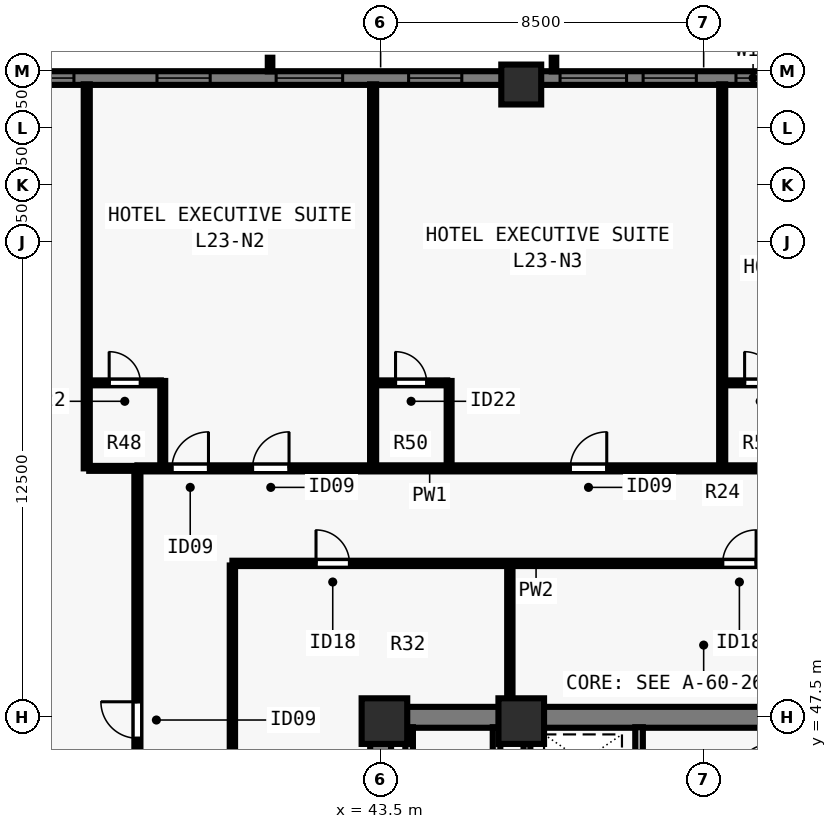
"""IFC4 building model, lengths in metres.
Left out: names, types, materials, properties, quantities, classifications, styles, units other than length and angle.
Written with IfcOpenShell. Run it as: python <this file> out.ifc"""

import sys

from ifc_helpers import new_model, si_unit, direction, frame, frame_2d, origin, origin_2d, place, context, subcontext, project, spatial, rectangle, extrude, element, fill, save


model = new_model("IFC4")
c1 = context("Model", 3, precision=1e-05, world=origin(), true_north=direction((0.0, 1.0)))
c2 = subcontext(c1, "Body", "Model", "MODEL_VIEW")
j1 = project(units=[si_unit("LENGTHUNIT", "METRE"), si_unit("PLANEANGLEUNIT", "RADIAN")], contexts=[c1])
p1 = place(None, origin())
s1 = spatial("IfcSite", under=j1, at=p1, CompositionType="ELEMENT")
p2 = place(p1, origin())
s2 = spatial("IfcBuilding", under=s1, at=p2, CompositionType="ELEMENT")
p3 = place(p2, frame((0.0, 0.0, 86.5)))
s3 = spatial("IfcBuildingStorey", under=s2, at=p3, CompositionType="ELEMENT", Elevation=86.5)
for number, where, z_axis, x_axis in (
    (1, (43.6, 47.4, 0.0), (0.0, 0.0, 1.0), (1.0, 0.0, 0.0)),
    (2, (47.2, 47.4, 0.0), (0.0, 0.0, 1.0), (1.0, 0.0, 0.0)),
):
    element("IfcColumn", number, at=place(p3, frame(where, z_axis=z_axis, x_axis=x_axis)), inside=s3, PredefinedType="COLUMN", context=c2, shape_type="SweptSolid", body=[
        extrude(rectangle(XDim=1.2, YDim=1.2, at=origin_2d()), origin(), (0.0, 0.0, 1.0), 3.5),
    ])
p4 = place(p3, frame((47.2, 64.15, 0.0), z_axis=(0.0, 0.0, 1.0), x_axis=(1.0, 0.0, 0.0)))
e3 = element("IfcColumn", 3, at=p4, inside=s3, PredefinedType="COLUMN", context=c2, shape_type="SweptSolid", body=[
    extrude(rectangle(XDim=1.05, YDim=1.05, at=origin_2d()), origin(), (0.0, 0.0, 1.0), 3.5),
])
p5 = place(p3, frame((29.5, 64.32, 0.0), z_axis=(0.0, 0.0, 1.0), x_axis=(1.0, 0.0, 0.0)))
e4 = element("IfcWall", 4, at=p5, inside=s3, PredefinedType="SOLIDWALL", context=c2, shape_type="SweptSolid", body=[
    extrude(rectangle(XDim=27.562, YDim=0.36, at=frame_2d((13.781, 0.0))), origin(), (0.0, 0.0, 1.0), 3.28),
])
p6 = place(p5, frame((4.18, 0.0, 0.8)))
e5 = element("IfcOpeningElement", 5, at=p6, cuts=e4, PredefinedType="OPENING", context=c2, shape_type="SweptSolid", body=[
    extrude(rectangle(XDim=1.75, YDim=1.544, at=frame_2d((0.875, 0.772))), frame((0.0, 0.19, 0.0), z_axis=(0.0, -1.0, 0.0), x_axis=(1.0, 0.0, 0.0)), (0.0, 0.0, 1.0), 0.38),
])
p7 = place(p5, frame((8.115, 0.0, 0.8)))
e6 = element("IfcOpeningElement", 6, at=p7, cuts=e4, PredefinedType="OPENING", context=c2, shape_type="SweptSolid", body=[
    extrude(rectangle(XDim=1.4, YDim=1.544, at=frame_2d((0.7, 0.772))), frame((0.0, 0.19, 0.0), z_axis=(0.0, -1.0, 0.0), x_axis=(1.0, 0.0, 0.0)), (0.0, 0.0, 1.0), 0.38),
])
p8 = place(p5, frame((11.251, 0.0, 0.8)))
e7 = element("IfcOpeningElement", 7, at=p8, cuts=e4, PredefinedType="OPENING", context=c2, shape_type="SweptSolid", body=[
    extrude(rectangle(XDim=1.75, YDim=1.544, at=frame_2d((0.875, 0.772))), frame((0.0, 0.19, 0.0), z_axis=(0.0, -1.0, 0.0), x_axis=(1.0, 0.0, 0.0)), (0.0, 0.0, 1.0), 0.38),
])
p9 = place(p5, frame((14.736, 0.0, 0.8)))
e8 = element("IfcOpeningElement", 8, at=p9, cuts=e4, PredefinedType="OPENING", context=c2, shape_type="SweptSolid", body=[
    extrude(rectangle(XDim=1.4, YDim=1.544, at=frame_2d((0.7, 0.772))), frame((0.0, 0.19, 0.0), z_axis=(0.0, -1.0, 0.0), x_axis=(1.0, 0.0, 0.0)), (0.0, 0.0, 1.0), 0.38),
])
p10 = place(p5, frame((18.721, 0.0, 0.8)))
e9 = element("IfcOpeningElement", 9, at=p10, cuts=e4, PredefinedType="OPENING", context=c2, shape_type="SweptSolid", body=[
    extrude(rectangle(XDim=1.75, YDim=1.544, at=frame_2d((0.875, 0.772))), frame((0.0, 0.19, 0.0), z_axis=(0.0, -1.0, 0.0), x_axis=(1.0, 0.0, 0.0)), (0.0, 0.0, 1.0), 0.38),
])
p11 = place(p5, frame((20.907, 0.0, 0.8)))
e10 = element("IfcOpeningElement", 10, at=p11, cuts=e4, PredefinedType="OPENING", context=c2, shape_type="SweptSolid", body=[
    extrude(rectangle(XDim=1.4, YDim=1.544, at=frame_2d((0.7, 0.772))), frame((0.0, 0.19, 0.0), z_axis=(0.0, -1.0, 0.0), x_axis=(1.0, 0.0, 0.0)), (0.0, 0.0, 1.0), 0.38),
])
p12 = place(p5, frame((23.35, 0.0, 0.8)))
e11 = element("IfcOpeningElement", 11, at=p12, cuts=e4, PredefinedType="OPENING", context=c2, shape_type="SweptSolid", body=[
    extrude(rectangle(XDim=0.9, YDim=1.544, at=frame_2d((0.45, 0.772))), frame((0.0, 0.19, 0.0), z_axis=(0.0, -1.0, 0.0), x_axis=(1.0, 0.0, 0.0)), (0.0, 0.0, 1.0), 0.38),
])
p13 = place(p3, frame((43.225, 47.5, 0.0), z_axis=(0.0, 0.0, 1.0), x_axis=(1.0, 0.0, 0.0)))
e12 = element("IfcWall", 12, at=p13, inside=s3, PredefinedType="SHEAR", context=c2, shape_type="SweptSolid", body=[
    extrude(rectangle(XDim=17.55, YDim=0.55, at=frame_2d((8.775, 0.0))), origin(), (0.0, 0.0, 1.0), 3.28),
])
p14 = place(p3, frame((43.5, 40.8, 0.0), z_axis=(0.0, 0.0, 1.0), x_axis=(0.0, 1.0, 0.0)))
e13 = element("IfcWall", 13, at=p14, inside=s3, PredefinedType="SHEAR", context=c2, shape_type="SweptSolid", body=[
    extrude(rectangle(XDim=6.435, YDim=0.55, at=frame_2d((3.218, 0.0))), origin(), (0.0, 0.0, 1.0), 3.28),
])
p15 = place(p3, frame((50.3, 40.585, 0.0), z_axis=(0.0, 0.0, 1.0), x_axis=(0.0, 1.0, 0.0)))
e14 = element("IfcWall", 14, at=p15, inside=s3, PredefinedType="SOLIDWALL", context=c2, shape_type="SweptSolid", body=[
    extrude(rectangle(XDim=6.655, YDim=0.2, at=frame_2d((3.328, 0.0))), origin(), (0.0, 0.0, 1.0), 3.28),
])
p16 = place(p15, frame((5.065, 0.0, 0.0)))
e15 = element("IfcOpeningElement", 15, at=p16, cuts=e14, PredefinedType="OPENING", context=c2, shape_type="SweptSolid", body=[
    extrude(rectangle(XDim=0.8, YDim=2.08, at=frame_2d((0.4, 1.04))), frame((0.0, 0.11, 0.0), z_axis=(0.0, -1.0, 0.0), x_axis=(1.0, 0.0, 0.0)), (0.0, 0.0, 1.0), 0.22),
])
for number, where, z_axis, x_axis in (
    (16, (46.55, 43.735, 0.0), (0.0, 0.0, 1.0), (0.0, 1.0, 0.0)),
    (17, (44.25, 43.735, 0.0), (0.0, 0.0, 1.0), (0.0, 1.0, 0.0)),
):
    element("IfcWall", number, at=place(p3, frame(where, z_axis=z_axis, x_axis=x_axis)), inside=s3, PredefinedType="SOLIDWALL", context=c2, shape_type="SweptSolid", body=[
        extrude(rectangle(XDim=3.505, YDim=0.2, at=frame_2d((1.752, 0.0))), origin(), (0.0, 0.0, 1.0), 3.28),
    ])
p17 = place(p3, frame((47.35, 43.735, 0.0), z_axis=(0.0, 0.0, 1.0), x_axis=(0.0, 1.0, 0.0)))
e18 = element("IfcWall", 18, at=p17, inside=s3, PredefinedType="SOLIDWALL", context=c2, shape_type="SweptSolid", body=[
    extrude(rectangle(XDim=3.505, YDim=0.18, at=frame_2d((1.752, 0.0))), origin(), (0.0, 0.0, 1.0), 3.28),
])
p18 = place(p3, frame((37.1, 54.05, 0.0), z_axis=(0.0, 0.0, 1.0), x_axis=(1.0, 0.0, 0.0)))
e19 = element("IfcWall", 19, at=p18, inside=s3, PredefinedType="PARTITIONING", context=c2, shape_type="SweptSolid", body=[
    extrude(rectangle(XDim=29.8, YDim=0.16, at=frame_2d((14.9, 0.0))), origin(), (0.0, 0.0, 1.0), 3.28),
])
p19 = place(p18, frame((0.91, 0.0, 0.0)))
e20 = element("IfcOpeningElement", 20, at=p19, cuts=e19, PredefinedType="OPENING", context=c2, shape_type="SweptSolid", body=[
    extrude(rectangle(XDim=0.96, YDim=2.15, at=frame_2d((0.48, 1.075))), frame((0.0, 0.09, 0.0), z_axis=(0.0, -1.0, 0.0), x_axis=(1.0, 0.0, 0.0)), (0.0, 0.0, 1.0), 0.18),
])
p20 = place(p18, frame((3.03, 0.0, 0.0)))
e21 = element("IfcOpeningElement", 21, at=p20, cuts=e19, PredefinedType="OPENING", context=c2, shape_type="SweptSolid", body=[
    extrude(rectangle(XDim=0.96, YDim=2.15, at=frame_2d((0.48, 1.075))), frame((0.0, 0.09, 0.0), z_axis=(0.0, -1.0, 0.0), x_axis=(1.0, 0.0, 0.0)), (0.0, 0.0, 1.0), 0.18),
])
p21 = place(p18, frame((11.39, 0.0, 0.0)))
e22 = element("IfcOpeningElement", 22, at=p21, cuts=e19, PredefinedType="OPENING", context=c2, shape_type="SweptSolid", body=[
    extrude(rectangle(XDim=0.96, YDim=2.15, at=frame_2d((0.48, 1.075))), frame((0.0, 0.09, 0.0), z_axis=(0.0, -1.0, 0.0), x_axis=(1.0, 0.0, 0.0)), (0.0, 0.0, 1.0), 0.18),
])
p22 = place(p18, frame((19.75, 0.0, 0.0)))
e23 = element("IfcOpeningElement", 23, at=p22, cuts=e19, PredefinedType="OPENING", context=c2, shape_type="SweptSolid", body=[
    extrude(rectangle(XDim=0.96, YDim=2.15, at=frame_2d((0.48, 1.075))), frame((0.0, 0.09, 0.0), z_axis=(0.0, -1.0, 0.0), x_axis=(1.0, 0.0, 0.0)), (0.0, 0.0, 1.0), 0.18),
])
p23 = place(p18, frame((26.931, 0.0, 0.0)))
e24 = element("IfcOpeningElement", 24, at=p23, cuts=e19, PredefinedType="OPENING", context=c2, shape_type="SweptSolid", body=[
    extrude(rectangle(XDim=0.96, YDim=2.15, at=frame_2d((0.48, 1.075))), frame((0.0, 0.09, 0.0), z_axis=(0.0, -1.0, 0.0), x_axis=(1.0, 0.0, 0.0)), (0.0, 0.0, 1.0), 0.18),
])
p24 = place(p18, frame((28.48, 0.0, 0.0)))
e25 = element("IfcOpeningElement", 25, at=p24, cuts=e19, PredefinedType="OPENING", context=c2, shape_type="SweptSolid", body=[
    extrude(rectangle(XDim=0.96, YDim=2.15, at=frame_2d((0.48, 1.075))), frame((0.0, 0.09, 0.0), z_axis=(0.0, -1.0, 0.0), x_axis=(1.0, 0.0, 0.0)), (0.0, 0.0, 1.0), 0.18),
])
p25 = place(p3, frame((37.1, 24.015, 0.0), z_axis=(0.0, 0.0, 1.0), x_axis=(0.0, 1.0, 0.0)))
e26 = element("IfcWall", 26, at=p25, inside=s3, PredefinedType="PARTITIONING", context=c2, shape_type="SweptSolid", body=[
    extrude(rectangle(XDim=29.97, YDim=0.16, at=frame_2d((14.985, 0.0))), origin(), (0.0, 0.0, 1.0), 3.28),
])
p26 = place(p25, frame((8.134, 0.0, 0.0)))
e27 = element("IfcOpeningElement", 27, at=p26, cuts=e26, PredefinedType="OPENING", context=c2, shape_type="SweptSolid", body=[
    extrude(rectangle(XDim=0.96, YDim=2.15, at=frame_2d((0.48, 1.075))), frame((0.0, 0.09, 0.0), z_axis=(0.0, -1.0, 0.0), x_axis=(1.0, 0.0, 0.0)), (0.0, 0.0, 1.0), 0.18),
])
p27 = place(p25, frame((22.934, 0.0, 0.0)))
e28 = element("IfcOpeningElement", 28, at=p27, cuts=e26, PredefinedType="OPENING", context=c2, shape_type="SweptSolid", body=[
    extrude(rectangle(XDim=0.96, YDim=2.15, at=frame_2d((0.48, 1.075))), frame((0.0, 0.09, 0.0), z_axis=(0.0, -1.0, 0.0), x_axis=(1.0, 0.0, 0.0)), (0.0, 0.0, 1.0), 0.18),
])
p28 = place(p3, frame((39.6, 51.55, 0.0), z_axis=(0.0, 0.0, 1.0), x_axis=(1.0, 0.0, 0.0)))
e29 = element("IfcWall", 29, at=p28, inside=s3, PredefinedType="PARTITIONING", context=c2, shape_type="SweptSolid", body=[
    extrude(rectangle(XDim=24.8, YDim=0.14, at=frame_2d((12.4, 0.0))), origin(), (0.0, 0.0, 1.0), 3.28),
])
p29 = place(p28, frame((2.2, 0.0, 0.0)))
e30 = element("IfcOpeningElement", 30, at=p29, cuts=e29, PredefinedType="OPENING", context=c2, shape_type="SweptSolid", body=[
    extrude(rectangle(XDim=0.88, YDim=2.1, at=frame_2d((0.44, 1.05))), frame((0.0, 0.08, 0.0), z_axis=(0.0, -1.0, 0.0), x_axis=(1.0, 0.0, 0.0)), (0.0, 0.0, 1.0), 0.16),
])
p30 = place(p28, frame((12.9, 0.0, 0.0)))
e31 = element("IfcOpeningElement", 31, at=p30, cuts=e29, PredefinedType="OPENING", context=c2, shape_type="SweptSolid", body=[
    extrude(rectangle(XDim=0.88, YDim=2.1, at=frame_2d((0.44, 1.05))), frame((0.0, 0.08, 0.0), z_axis=(0.0, -1.0, 0.0), x_axis=(1.0, 0.0, 0.0)), (0.0, 0.0, 1.0), 0.16),
])
p31 = place(p28, frame((22.4, 0.0, 0.0)))
e32 = element("IfcOpeningElement", 32, at=p31, cuts=e29, PredefinedType="OPENING", context=c2, shape_type="SweptSolid", body=[
    extrude(rectangle(XDim=0.88, YDim=2.1, at=frame_2d((0.44, 1.05))), frame((0.0, 0.08, 0.0), z_axis=(0.0, -1.0, 0.0), x_axis=(1.0, 0.0, 0.0)), (0.0, 0.0, 1.0), 0.16),
])
p32 = place(p3, frame((39.6, 40.8, 0.0), z_axis=(0.0, 0.0, 1.0), x_axis=(0.0, 1.0, 0.0)))
e33 = element("IfcWall", 33, at=p32, inside=s3, PredefinedType="PARTITIONING", context=c2, shape_type="SweptSolid", body=[
    extrude(rectangle(XDim=10.695, YDim=0.14, at=frame_2d((5.348, 0.0))), origin(), (0.0, 0.0, 1.0), 3.28),
])
p33 = place(p32, frame((2.5, 0.0, 0.0)))
e34 = element("IfcOpeningElement", 34, at=p33, cuts=e33, PredefinedType="OPENING", context=c2, shape_type="SweptSolid", body=[
    extrude(rectangle(XDim=0.88, YDim=2.1, at=frame_2d((0.44, 1.05))), frame((0.0, 0.08, 0.0), z_axis=(0.0, -1.0, 0.0), x_axis=(1.0, 0.0, 0.0)), (0.0, 0.0, 1.0), 0.16),
])
p34 = place(p3, frame((46.9, 47.76, 0.0), z_axis=(0.0, 0.0, 1.0), x_axis=(0.0, 1.0, 0.0)))
e35 = element("IfcWall", 35, at=p34, inside=s3, PredefinedType="PARTITIONING", context=c2, shape_type="SweptSolid", body=[
    extrude(rectangle(XDim=3.735, YDim=0.14, at=frame_2d((1.868, 0.0))), origin(), (0.0, 0.0, 1.0), 3.28),
])
p35 = place(p3, frame((35.768, 54.05, 0.0), z_axis=(0.0, 0.0, 1.0), x_axis=(0.0, 1.0, 0.0)))
e36 = element("IfcWall", 36, at=p35, inside=s3, PredefinedType="PARTITIONING", context=c2, shape_type="SweptSolid", body=[
    extrude(rectangle(XDim=10.105, YDim=0.16, at=frame_2d((5.052, 0.0))), origin(), (0.0, 0.0, 1.0), 2.439),
])
p36 = place(p3, frame((37.768, 54.115, 0.0), z_axis=(0.0, 0.0, 1.0), x_axis=(0.0, 1.0, 0.0)))
e37 = element("IfcWall", 37, at=p36, inside=s3, PredefinedType="PLUMBINGWALL", context=c2, shape_type="SweptSolid", body=[
    extrude(rectangle(XDim=2.235, YDim=0.13, at=frame_2d((1.118, 0.0))), origin(), (0.0, 0.0, 1.0), 2.439),
])
p37 = place(p3, frame((35.833, 56.3, 0.0), z_axis=(0.0, 0.0, 1.0), x_axis=(1.0, 0.0, 0.0)))
e38 = element("IfcWall", 38, at=p37, inside=s3, PredefinedType="PLUMBINGWALL", context=c2, shape_type="SweptSolid", body=[
    extrude(rectangle(XDim=1.885, YDim=0.13, at=frame_2d((0.942, 0.0))), origin(), (0.0, 0.0, 1.0), 3.28),
])
p38 = place(p37, frame((0.525, 0.0, 0.0)))
e39 = element("IfcOpeningElement", 39, at=p38, cuts=e38, PredefinedType="OPENING", context=c2, shape_type="SweptSolid", body=[
    extrude(rectangle(XDim=0.82, YDim=2.1, at=frame_2d((0.41, 1.05))), frame((0.0, 0.075, 0.0), z_axis=(0.0, -1.0, 0.0), x_axis=(1.0, 0.0, 0.0)), (0.0, 0.0, 1.0), 0.15),
])
p39 = place(p3, frame((35.833, 54.05, 0.0), z_axis=(0.0, 0.0, 1.0), x_axis=(1.0, 0.0, 0.0)))
e40 = element("IfcWall", 40, at=p39, inside=s3, PredefinedType="PLUMBINGWALL", context=c2, shape_type="SweptSolid", body=[
    extrude(rectangle(XDim=1.188, YDim=0.13, at=frame_2d((0.594, 0.0))), origin(), (0.0, 0.0, 1.0), 3.28),
])
p40 = place(p3, frame((43.302, 54.115, 0.0), z_axis=(0.0, 0.0, 1.0), x_axis=(0.0, 1.0, 0.0)))
e41 = element("IfcWall", 41, at=p40, inside=s3, PredefinedType="PARTITIONING", context=c2, shape_type="SweptSolid", body=[
    extrude(rectangle(XDim=10.04, YDim=0.16, at=frame_2d((5.02, 0.0))), origin(), (0.0, 0.0, 1.0), 3.28),
])
p41 = place(p3, frame((45.302, 54.115, 0.0), z_axis=(0.0, 0.0, 1.0), x_axis=(0.0, 1.0, 0.0)))
e42 = element("IfcWall", 42, at=p41, inside=s3, PredefinedType="PLUMBINGWALL", context=c2, shape_type="SweptSolid", body=[
    extrude(rectangle(XDim=2.235, YDim=0.13, at=frame_2d((1.118, 0.0))), origin(), (0.0, 0.0, 1.0), 3.28),
])
p42 = place(p3, frame((43.367, 56.3, 0.0), z_axis=(0.0, 0.0, 1.0), x_axis=(1.0, 0.0, 0.0)))
e43 = element("IfcWall", 43, at=p42, inside=s3, PredefinedType="PLUMBINGWALL", context=c2, shape_type="SweptSolid", body=[
    extrude(rectangle(XDim=1.885, YDim=0.13, at=frame_2d((0.942, 0.0))), origin(), (0.0, 0.0, 1.0), 3.28),
])
p43 = place(p42, frame((0.525, 0.0, 0.0)))
e44 = element("IfcOpeningElement", 44, at=p43, cuts=e43, PredefinedType="OPENING", context=c2, shape_type="SweptSolid", body=[
    extrude(rectangle(XDim=0.82, YDim=2.1, at=frame_2d((0.41, 1.05))), frame((0.0, 0.075, 0.0), z_axis=(0.0, -1.0, 0.0), x_axis=(1.0, 0.0, 0.0)), (0.0, 0.0, 1.0), 0.15),
])
p44 = place(p3, frame((52.488, 54.115, 0.0), z_axis=(0.0, 0.0, 1.0), x_axis=(0.0, 1.0, 0.0)))
e45 = element("IfcWall", 45, at=p44, inside=s3, PredefinedType="PARTITIONING", context=c2, shape_type="SweptSolid", body=[
    extrude(rectangle(XDim=10.04, YDim=0.16, at=frame_2d((5.02, 0.0))), origin(), (0.0, 0.0, 1.0), 2.849),
])
p45 = place(p3, frame((52.552, 56.3, 0.0), z_axis=(0.0, 0.0, 1.0), x_axis=(1.0, 0.0, 0.0)))
e46 = element("IfcWall", 46, at=p45, inside=s3, PredefinedType="PLUMBINGWALL", context=c2, shape_type="SweptSolid", body=[
    extrude(rectangle(XDim=1.885, YDim=0.13, at=frame_2d((0.942, 0.0))), origin(), (0.0, 0.0, 1.0), 3.28),
])
p46 = place(p45, frame((0.525, 0.0, 0.0)))
e47 = element("IfcOpeningElement", 47, at=p46, cuts=e46, PredefinedType="OPENING", context=c2, shape_type="SweptSolid", body=[
    extrude(rectangle(XDim=0.82, YDim=2.1, at=frame_2d((0.41, 1.05))), frame((0.0, 0.075, 0.0), z_axis=(0.0, -1.0, 0.0), x_axis=(1.0, 0.0, 0.0)), (0.0, 0.0, 1.0), 0.15),
])
p47 = place(p6, origin())
e48 = element("IfcWindow", 48, at=p47, inside=s3, PartitioningType="SINGLE_PANEL", PredefinedType="WINDOW", context=c2, shape_type="SweptSolid", body=[
    extrude(rectangle(XDim=1.75, YDim=1.544, at=frame_2d((0.875, 0.772))), frame((0.0, -0.05, 0.0), z_axis=(0.0, -1.0, 0.0), x_axis=(1.0, 0.0, 0.0)), (0.0, 0.0, 1.0), 0.06),
])
fill(e5, e48)
p48 = place(p7, origin())
e49 = element("IfcWindow", 49, at=p48, inside=s3, PartitioningType="SINGLE_PANEL", PredefinedType="WINDOW", context=c2, shape_type="SweptSolid", body=[
    extrude(rectangle(XDim=1.4, YDim=1.544, at=frame_2d((0.7, 0.772))), frame((0.0, -0.05, 0.0), z_axis=(0.0, -1.0, 0.0), x_axis=(1.0, 0.0, 0.0)), (0.0, 0.0, 1.0), 0.06),
])
fill(e6, e49)
p49 = place(p8, origin())
e50 = element("IfcWindow", 50, at=p49, inside=s3, PartitioningType="SINGLE_PANEL", PredefinedType="WINDOW", context=c2, shape_type="SweptSolid", body=[
    extrude(rectangle(XDim=1.75, YDim=1.544, at=frame_2d((0.875, 0.772))), frame((0.0, -0.05, 0.0), z_axis=(0.0, -1.0, 0.0), x_axis=(1.0, 0.0, 0.0)), (0.0, 0.0, 1.0), 0.06),
])
fill(e7, e50)
p50 = place(p9, origin())
e51 = element("IfcWindow", 51, at=p50, inside=s3, PartitioningType="SINGLE_PANEL", PredefinedType="WINDOW", context=c2, shape_type="SweptSolid", body=[
    extrude(rectangle(XDim=1.4, YDim=1.544, at=frame_2d((0.7, 0.772))), frame((0.0, -0.05, 0.0), z_axis=(0.0, -1.0, 0.0), x_axis=(1.0, 0.0, 0.0)), (0.0, 0.0, 1.0), 0.06),
])
fill(e8, e51)
p51 = place(p10, origin())
e52 = element("IfcWindow", 52, at=p51, inside=s3, PartitioningType="SINGLE_PANEL", PredefinedType="WINDOW", context=c2, shape_type="SweptSolid", body=[
    extrude(rectangle(XDim=1.75, YDim=1.544, at=frame_2d((0.875, 0.772))), frame((0.0, -0.05, 0.0), z_axis=(0.0, -1.0, 0.0), x_axis=(1.0, 0.0, 0.0)), (0.0, 0.0, 1.0), 0.06),
])
fill(e9, e52)
p52 = place(p11, origin())
e53 = element("IfcWindow", 53, at=p52, inside=s3, PartitioningType="SINGLE_PANEL", PredefinedType="WINDOW", context=c2, shape_type="SweptSolid", body=[
    extrude(rectangle(XDim=1.4, YDim=1.544, at=frame_2d((0.7, 0.772))), frame((0.0, -0.05, 0.0), z_axis=(0.0, -1.0, 0.0), x_axis=(1.0, 0.0, 0.0)), (0.0, 0.0, 1.0), 0.06),
])
fill(e10, e53)
p53 = place(p12, origin())
e54 = element("IfcWindow", 54, at=p53, inside=s3, PartitioningType="SINGLE_PANEL", PredefinedType="WINDOW", context=c2, shape_type="SweptSolid", body=[
    extrude(rectangle(XDim=0.9, YDim=1.544, at=frame_2d((0.45, 0.772))), frame((0.0, -0.04, 0.0), z_axis=(0.0, -1.0, 0.0), x_axis=(1.0, 0.0, 0.0)), (0.0, 0.0, 1.0), 0.06),
])
fill(e11, e54)
p54 = place(p29, origin())
e55 = element("IfcDoor", 55, at=p54, inside=s3, OperationType="SINGLE_SWING_LEFT", PredefinedType="DOOR", context=c2, shape_type="SweptSolid", body=[
    extrude(rectangle(XDim=0.88, YDim=2.1, at=frame_2d((0.44, 1.05))), frame((0.0, 0.025, 0.0), z_axis=(0.0, -1.0, 0.0), x_axis=(1.0, 0.0, 0.0)), (0.0, 0.0, 1.0), 0.05),
])
fill(e30, e55)
p55 = place(p30, origin())
e56 = element("IfcDoor", 56, at=p55, inside=s3, OperationType="SINGLE_SWING_RIGHT", PredefinedType="DOOR", context=c2, shape_type="SweptSolid", body=[
    extrude(rectangle(XDim=0.88, YDim=2.1, at=frame_2d((0.44, 1.05))), frame((0.0, 0.025, 0.0), z_axis=(0.0, -1.0, 0.0), x_axis=(1.0, 0.0, 0.0)), (0.0, 0.0, 1.0), 0.05),
])
fill(e31, e56)
p56 = place(p19, origin())
e57 = element("IfcDoor", 57, at=p56, inside=s3, OperationType="SINGLE_SWING_RIGHT", PredefinedType="DOOR", context=c2, shape_type="SweptSolid", body=[
    extrude(rectangle(XDim=0.96, YDim=2.15, at=frame_2d((0.48, 1.075))), frame((0.0, 0.025, 0.0), z_axis=(0.0, -1.0, 0.0), x_axis=(1.0, 0.0, 0.0)), (0.0, 0.0, 1.0), 0.05),
])
fill(e20, e57)
p57 = place(p38, origin())
e58 = element("IfcDoor", 58, at=p57, inside=s3, OperationType="SINGLE_SWING_LEFT", PredefinedType="DOOR", context=c2, shape_type="SweptSolid", body=[
    extrude(rectangle(XDim=0.82, YDim=2.1, at=frame_2d((0.41, 1.05))), frame((0.0, 0.025, 0.0), z_axis=(0.0, -1.0, 0.0), x_axis=(1.0, 0.0, 0.0)), (0.0, 0.0, 1.0), 0.05),
])
fill(e39, e58)
p58 = place(p20, origin())
e59 = element("IfcDoor", 59, at=p58, inside=s3, OperationType="SINGLE_SWING_RIGHT", PredefinedType="DOOR", context=c2, shape_type="SweptSolid", body=[
    extrude(rectangle(XDim=0.96, YDim=2.15, at=frame_2d((0.48, 1.075))), frame((0.0, 0.025, 0.0), z_axis=(0.0, -1.0, 0.0), x_axis=(1.0, 0.0, 0.0)), (0.0, 0.0, 1.0), 0.05),
])
fill(e21, e59)
p59 = place(p43, origin())
e60 = element("IfcDoor", 60, at=p59, inside=s3, OperationType="SINGLE_SWING_LEFT", PredefinedType="DOOR", context=c2, shape_type="SweptSolid", body=[
    extrude(rectangle(XDim=0.82, YDim=2.1, at=frame_2d((0.41, 1.05))), frame((0.0, 0.025, 0.0), z_axis=(0.0, -1.0, 0.0), x_axis=(1.0, 0.0, 0.0)), (0.0, 0.0, 1.0), 0.05),
])
fill(e44, e60)
p60 = place(p21, origin())
e61 = element("IfcDoor", 61, at=p60, inside=s3, OperationType="SINGLE_SWING_RIGHT", PredefinedType="DOOR", context=c2, shape_type="SweptSolid", body=[
    extrude(rectangle(XDim=0.96, YDim=2.15, at=frame_2d((0.48, 1.075))), frame((0.0, 0.025, 0.0), z_axis=(0.0, -1.0, 0.0), x_axis=(1.0, 0.0, 0.0)), (0.0, 0.0, 1.0), 0.05),
])
fill(e22, e61)
p61 = place(p46, origin())
e62 = element("IfcDoor", 62, at=p61, inside=s3, OperationType="SINGLE_SWING_LEFT", PredefinedType="DOOR", context=c2, shape_type="SweptSolid", body=[
    extrude(rectangle(XDim=0.82, YDim=2.1, at=frame_2d((0.41, 1.05))), frame((0.0, 0.025, 0.0), z_axis=(0.0, -1.0, 0.0), x_axis=(1.0, 0.0, 0.0)), (0.0, 0.0, 1.0), 0.05),
])
fill(e47, e62)
p62 = place(p27, origin())
e63 = element("IfcDoor", 63, at=p62, inside=s3, OperationType="SINGLE_SWING_RIGHT", PredefinedType="DOOR", context=c2, shape_type="SweptSolid", body=[
    extrude(rectangle(XDim=0.96, YDim=2.15, at=frame_2d((0.48, 1.075))), frame((0.0, 0.025, 0.0), z_axis=(0.0, -1.0, 0.0), x_axis=(1.0, 0.0, 0.0)), (0.0, 0.0, 1.0), 0.05),
])
fill(e28, e63)
save(model, sys.argv[1])
